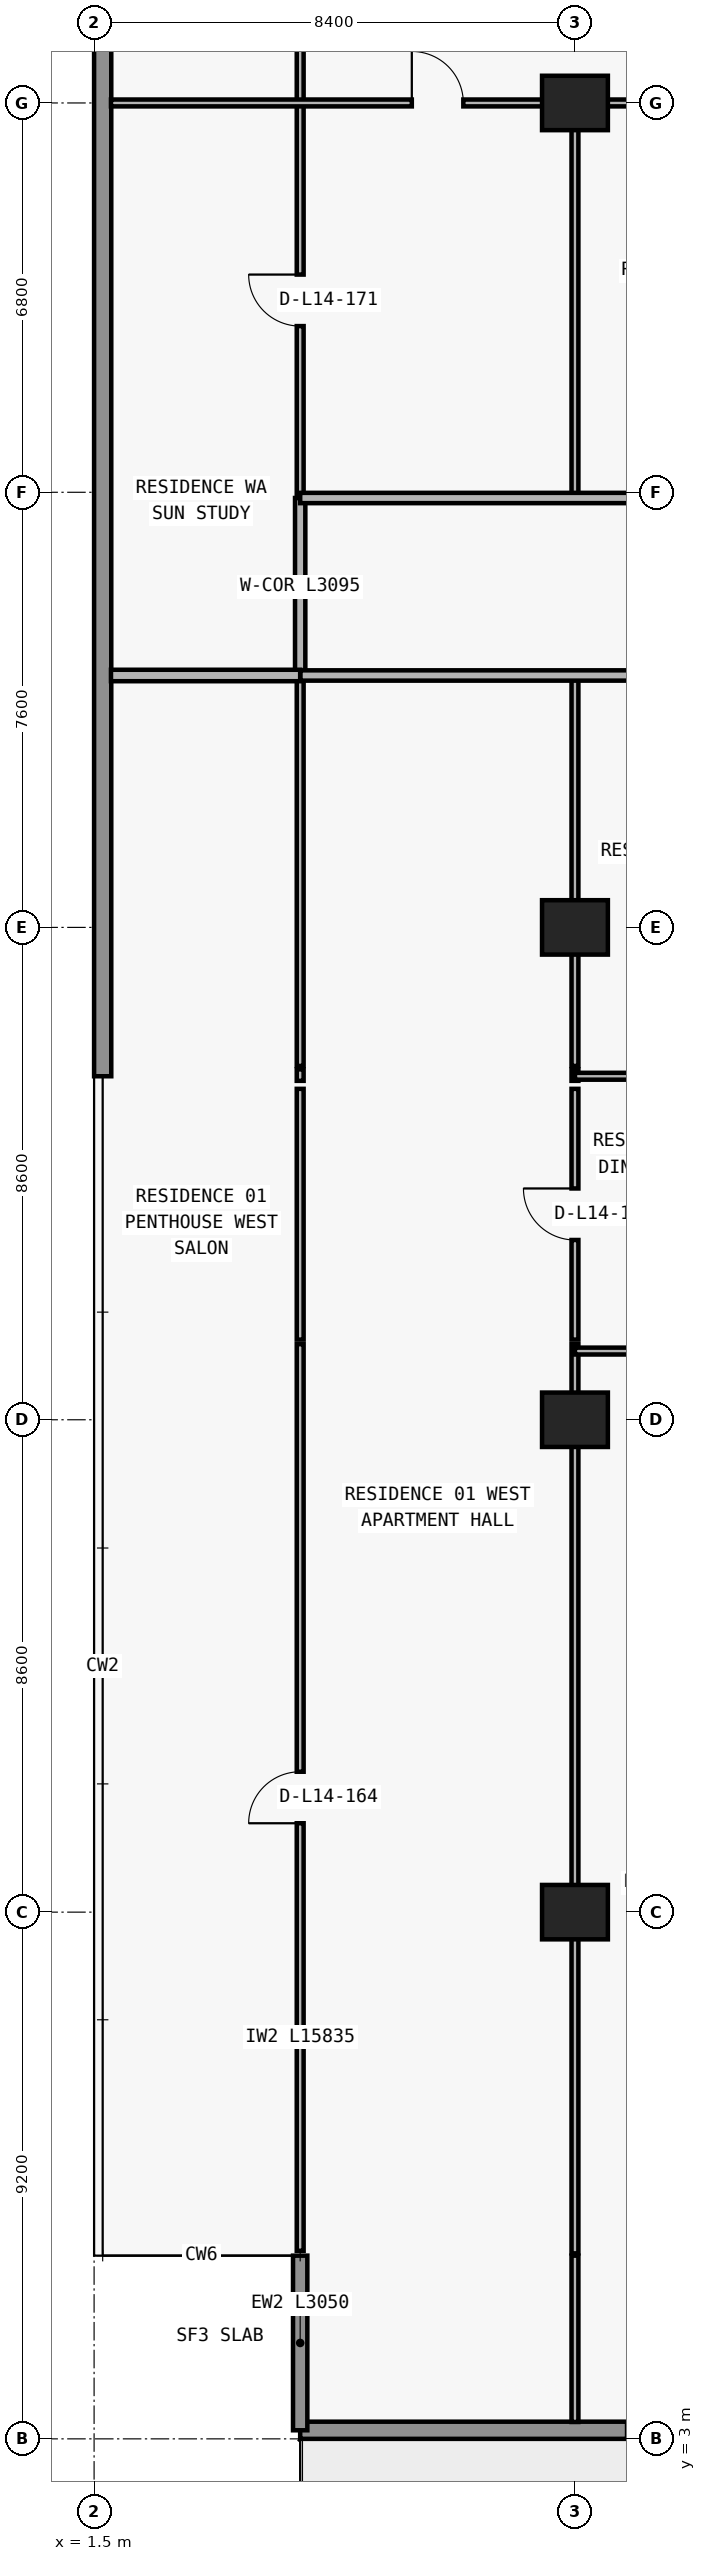
"""IFC4 building model, lengths in metres.
Left out: names, types, materials, properties, quantities, classifications, styles, units other than length and angle.
Written with IfcOpenShell. Run it as: python <this file> out.ifc"""

import sys

from ifc_helpers import new_model, si_unit, direction, frame, frame_2d, origin, origin_2d, place, context, subcontext, project, spatial, rectangle, extrude, element, fill, save


model = new_model("IFC4")
c1 = context("Model", 3, precision=1e-05, world=origin(), true_north=direction((0.0, 1.0)))
c2 = subcontext(c1, "Body", "Model", "MODEL_VIEW")
j1 = project(units=[si_unit("LENGTHUNIT", "METRE"), si_unit("PLANEANGLEUNIT", "RADIAN")], contexts=[c1])
p1 = place(None, origin())
s1 = spatial("IfcSite", under=j1, at=p1, CompositionType="ELEMENT")
p2 = place(p1, origin())
s2 = spatial("IfcBuilding", under=s1, at=p2, CompositionType="ELEMENT")
p3 = place(p2, frame((0.0, 0.0, 56.4)))
s3 = spatial("IfcBuildingStorey", under=s2, at=p3, CompositionType="ELEMENT", Elevation=56.4)
for number, where, z_axis, x_axis in (
    (1, (9.9, 12.2, 0.0), (0.0, 0.0, 1.0), (1.0, 0.0, 0.0)),
    (2, (9.9, 20.8, 0.0), (0.0, 0.0, 1.0), (1.0, 0.0, 0.0)),
    (3, (9.9, 29.4, 0.0), (0.0, 0.0, 1.0), (1.0, 0.0, 0.0)),
    (4, (9.9, 43.8, 0.0), (0.0, 0.0, 1.0), (1.0, 0.0, 0.0)),
):
    element("IfcColumn", number, at=place(p3, frame(where, z_axis=z_axis, x_axis=x_axis)), inside=s3, PredefinedType="COLUMN", context=c2, shape_type="SweptSolid", body=[
        extrude(rectangle(XDim=1.15, YDim=0.95, at=origin_2d()), origin(), (0.0, 0.0, 1.0), 3.05),
    ])
p4 = place(p3, frame((72.7, 3.15, 0.0), z_axis=(0.0, 0.0, 1.0), x_axis=(-1.0, 0.0, 0.0)))
e5 = element("IfcWall", 5, at=p4, inside=s3, PredefinedType="STANDARD", context=c2, shape_type="SweptSolid", body=[
    extrude(rectangle(XDim=67.6, YDim=0.3, at=frame_2d((33.8, 0.0))), origin(), (0.0, 0.0, 1.0), 3.05),
])
p5 = place(p4, frame((59.89, 0.0, 0.0)))
e6 = element("IfcOpeningElement", 6, at=p5, cuts=e5, PredefinedType="OPENING", context=c2, shape_type="SweptSolid", body=[
    extrude(rectangle(XDim=2.0, YDim=2.3, at=frame_2d((1.0, 1.15))), frame((0.0, 0.16, 0.0), z_axis=(0.0, -1.0, 0.0), x_axis=(1.0, 0.0, 0.0)), (0.0, 0.0, 1.0), 0.32),
])
p6 = place(p4, frame((55.21, 0.0, 0.65)))
e7 = element("IfcOpeningElement", 7, at=p6, cuts=e5, PredefinedType="OPENING", context=c2, shape_type="SweptSolid", body=[
    extrude(rectangle(XDim=2.6, YDim=1.85, at=frame_2d((1.3, 0.925))), frame((0.0, 0.16, 0.0), z_axis=(0.0, -1.0, 0.0), x_axis=(1.0, 0.0, 0.0)), (0.0, 0.0, 1.0), 0.32),
])
p7 = place(p4, frame((49.1, 0.0, 0.85)))
e8 = element("IfcOpeningElement", 8, at=p7, cuts=e5, PredefinedType="OPENING", context=c2, shape_type="SweptSolid", body=[
    extrude(rectangle(XDim=2.2, YDim=1.55, at=frame_2d((1.1, 0.775))), frame((0.0, 0.16, 0.0), z_axis=(0.0, -1.0, 0.0), x_axis=(1.0, 0.0, 0.0)), (0.0, 0.0, 1.0), 0.32),
])
p8 = place(p4, frame((43.09, 0.0, 0.0)))
e9 = element("IfcOpeningElement", 9, at=p8, cuts=e5, PredefinedType="OPENING", context=c2, shape_type="SweptSolid", body=[
    extrude(rectangle(XDim=2.0, YDim=2.3, at=frame_2d((1.0, 1.15))), frame((0.0, 0.16, 0.0), z_axis=(0.0, -1.0, 0.0), x_axis=(1.0, 0.0, 0.0)), (0.0, 0.0, 1.0), 0.32),
])
p9 = place(p4, frame((38.41, 0.0, 0.65)))
e10 = element("IfcOpeningElement", 10, at=p9, cuts=e5, PredefinedType="OPENING", context=c2, shape_type="SweptSolid", body=[
    extrude(rectangle(XDim=2.6, YDim=1.85, at=frame_2d((1.3, 0.925))), frame((0.0, 0.16, 0.0), z_axis=(0.0, -1.0, 0.0), x_axis=(1.0, 0.0, 0.0)), (0.0, 0.0, 1.0), 0.32),
])
p10 = place(p4, frame((32.7, 0.0, 0.85)))
e11 = element("IfcOpeningElement", 11, at=p10, cuts=e5, PredefinedType="OPENING", context=c2, shape_type="SweptSolid", body=[
    extrude(rectangle(XDim=2.2, YDim=1.55, at=frame_2d((1.1, 0.775))), frame((0.0, 0.16, 0.0), z_axis=(0.0, -1.0, 0.0), x_axis=(1.0, 0.0, 0.0)), (0.0, 0.0, 1.0), 0.32),
])
p11 = place(p4, frame((27.026, 0.0, 0.0)))
e12 = element("IfcOpeningElement", 12, at=p11, cuts=e5, PredefinedType="OPENING", context=c2, shape_type="SweptSolid", body=[
    extrude(rectangle(XDim=2.0, YDim=2.3, at=frame_2d((1.0, 1.15))), frame((0.0, 0.16, 0.0), z_axis=(0.0, -1.0, 0.0), x_axis=(1.0, 0.0, 0.0)), (0.0, 0.0, 1.0), 0.32),
])
p12 = place(p4, frame((22.726, 0.0, 0.85)))
e13 = element("IfcOpeningElement", 13, at=p12, cuts=e5, PredefinedType="OPENING", context=c2, shape_type="SweptSolid", body=[
    extrude(rectangle(XDim=2.2, YDim=1.55, at=frame_2d((1.1, 0.775))), frame((0.0, 0.16, 0.0), z_axis=(0.0, -1.0, 0.0), x_axis=(1.0, 0.0, 0.0)), (0.0, 0.0, 1.0), 0.32),
])
p13 = place(p4, frame((18.29, 0.0, 0.0)))
e14 = element("IfcOpeningElement", 14, at=p13, cuts=e5, PredefinedType="OPENING", context=c2, shape_type="SweptSolid", body=[
    extrude(rectangle(XDim=2.0, YDim=2.3, at=frame_2d((1.0, 1.15))), frame((0.0, 0.16, 0.0), z_axis=(0.0, -1.0, 0.0), x_axis=(1.0, 0.0, 0.0)), (0.0, 0.0, 1.0), 0.32),
])
p14 = place(p4, frame((14.19, 0.0, 0.85)))
e15 = element("IfcOpeningElement", 15, at=p14, cuts=e5, PredefinedType="OPENING", context=c2, shape_type="SweptSolid", body=[
    extrude(rectangle(XDim=1.8, YDim=1.55, at=frame_2d((0.9, 0.775))), frame((0.0, 0.16, 0.0), z_axis=(0.0, -1.0, 0.0), x_axis=(1.0, 0.0, 0.0)), (0.0, 0.0, 1.0), 0.32),
])
p15 = place(p4, frame((10.226, 0.0, 0.0)))
e16 = element("IfcOpeningElement", 16, at=p15, cuts=e5, PredefinedType="OPENING", context=c2, shape_type="SweptSolid", body=[
    extrude(rectangle(XDim=2.0, YDim=2.3, at=frame_2d((1.0, 1.15))), frame((0.0, 0.16, 0.0), z_axis=(0.0, -1.0, 0.0), x_axis=(1.0, 0.0, 0.0)), (0.0, 0.0, 1.0), 0.32),
])
p16 = place(p4, frame((5.926, 0.0, 0.85)))
e17 = element("IfcOpeningElement", 17, at=p16, cuts=e5, PredefinedType="OPENING", context=c2, shape_type="SweptSolid", body=[
    extrude(rectangle(XDim=2.2, YDim=1.55, at=frame_2d((1.1, 0.775))), frame((0.0, 0.16, 0.0), z_axis=(0.0, -1.0, 0.0), x_axis=(1.0, 0.0, 0.0)), (0.0, 0.0, 1.0), 0.32),
])
p17 = place(p3, frame((5.1, 6.2, 0.0), z_axis=(0.0, 0.0, 1.0), x_axis=(0.0, -1.0, 0.0)))
e18 = element("IfcWall", 18, at=p17, inside=s3, PredefinedType="ELEMENTEDWALL", context=c2, shape_type="SweptSolid", body=[
    extrude(rectangle(XDim=3.05, YDim=0.25, at=frame_2d((1.525, 0.0))), origin(), (0.0, 0.0, 1.0), 3.05),
])
p18 = place(p3, frame((1.65, 26.8, 0.0), z_axis=(0.0, 0.0, 1.0), x_axis=(0.0, 1.0, 0.0)))
e19 = element("IfcWall", 19, at=p18, inside=s3, PredefinedType="STANDARD", context=c2, shape_type="SweptSolid", body=[
    extrude(rectangle(XDim=20.6, YDim=0.3, at=frame_2d((10.3, 0.0))), origin(), (0.0, 0.0, 1.0), 3.05),
])
p19 = place(p3, frame((5.1, 6.285, 0.0), z_axis=(0.0, 0.0, 1.0), x_axis=(0.0, 1.0, 0.0)))
e20 = element("IfcWall", 20, at=p19, inside=s3, PredefinedType="PARTITIONING", context=c2, shape_type="SweptSolid", body=[
    extrude(rectangle(XDim=15.835, YDim=0.12, at=frame_2d((7.917, 0.0))), origin(), (0.0, 0.0, 1.0), 3.05),
])
p20 = place(p19, frame((7.468, 0.0, 0.0)))
e21 = element("IfcOpeningElement", 21, at=p20, cuts=e20, PredefinedType="OPENING", context=c2, shape_type="SweptSolid", body=[
    extrude(rectangle(XDim=0.9, YDim=2.15, at=frame_2d((0.45, 1.075))), frame((0.0, 0.07, 0.0), z_axis=(0.0, -1.0, 0.0), x_axis=(1.0, 0.0, 0.0)), (0.0, 0.0, 1.0), 0.14),
])
p21 = place(p3, frame((5.1, 22.2, 0.0), z_axis=(0.0, 0.0, 1.0), x_axis=(0.0, 1.0, 0.0)))
e22 = element("IfcWall", 22, at=p21, inside=s3, PredefinedType="PARTITIONING", context=c2, shape_type="SweptSolid", body=[
    extrude(rectangle(XDim=4.38, YDim=0.12, at=frame_2d((2.19, 0.0))), origin(), (0.0, 0.0, 1.0), 3.05),
])
p22 = place(p3, frame((5.1, 26.72, 0.0), z_axis=(0.0, 0.0, 1.0), x_axis=(0.0, 1.0, 0.0)))
e23 = element("IfcWall", 23, at=p22, inside=s3, PredefinedType="PARTITIONING", context=c2, shape_type="SweptSolid", body=[
    extrude(rectangle(XDim=0.2, YDim=0.12, at=frame_2d((0.1, 0.0))), origin(), (0.0, 0.0, 1.0), 3.05),
])
p23 = place(p3, frame((5.1, 26.98, 0.0), z_axis=(0.0, 0.0, 1.0), x_axis=(0.0, 1.0, 0.0)))
e24 = element("IfcWall", 24, at=p23, inside=s3, PredefinedType="PARTITIONING", context=c2, shape_type="SweptSolid", body=[
    extrude(rectangle(XDim=6.82, YDim=0.12, at=frame_2d((3.41, 0.0))), origin(), (0.0, 0.0, 1.0), 3.05),
])
p24 = place(p3, frame((5.1, 33.805, 0.0), z_axis=(0.0, 0.0, 1.0), x_axis=(0.0, 1.0, 0.0)))
e25 = element("IfcWall", 25, at=p24, inside=s3, PredefinedType="PARTITIONING", context=c2, shape_type="SweptSolid", body=[
    extrude(rectangle(XDim=3.095, YDim=0.18, at=frame_2d((1.547, 0.0))), origin(), (0.0, 0.0, 1.0), 3.05),
])
p25 = place(p3, frame((5.1, 36.905, 0.0), z_axis=(0.0, 0.0, 1.0), x_axis=(0.0, 1.0, 0.0)))
e26 = element("IfcWall", 26, at=p25, inside=s3, PredefinedType="PARTITIONING", context=c2, shape_type="SweptSolid", body=[
    extrude(rectangle(XDim=10.375, YDim=0.12, at=frame_2d((5.188, 0.0))), origin(), (0.0, 0.0, 1.0), 3.05),
])
p26 = place(p25, frame((2.998, 0.0, 0.0)))
e27 = element("IfcOpeningElement", 27, at=p26, cuts=e26, PredefinedType="OPENING", context=c2, shape_type="SweptSolid", body=[
    extrude(rectangle(XDim=0.9, YDim=2.15, at=frame_2d((0.45, 1.075))), frame((0.0, 0.07, 0.0), z_axis=(0.0, -1.0, 0.0), x_axis=(1.0, 0.0, 0.0)), (0.0, 0.0, 1.0), 0.14),
])
p27 = place(p25, frame((8.185, 0.0, 0.0)))
e28 = element("IfcOpeningElement", 28, at=p27, cuts=e26, PredefinedType="OPENING", context=c2, shape_type="SweptSolid", body=[
    extrude(rectangle(XDim=0.9, YDim=2.15, at=frame_2d((0.45, 1.075))), frame((0.0, 0.07, 0.0), z_axis=(0.0, -1.0, 0.0), x_axis=(1.0, 0.0, 0.0)), (0.0, 0.0, 1.0), 0.14),
])
p28 = place(p3, frame((9.9, 3.295, 0.0), z_axis=(0.0, 0.0, 1.0), x_axis=(0.0, 1.0, 0.0)))
e29 = element("IfcWall", 29, at=p28, inside=s3, PredefinedType="PARTITIONING", context=c2, shape_type="SweptSolid", body=[
    extrude(rectangle(XDim=2.905, YDim=0.12, at=frame_2d((1.453, 0.0))), origin(), (0.0, 0.0, 1.0), 3.05),
])
p29 = place(p3, frame((9.9, 6.24, 0.0), z_axis=(0.0, 0.0, 1.0), x_axis=(0.0, 1.0, 0.0)))
e30 = element("IfcWall", 30, at=p29, inside=s3, PredefinedType="PARTITIONING", context=c2, shape_type="SweptSolid", body=[
    extrude(rectangle(XDim=15.88, YDim=0.12, at=frame_2d((7.94, 0.0))), origin(), (0.0, 0.0, 1.0), 2.11),
])
p30 = place(p3, frame((9.9, 22.2, 0.0), z_axis=(0.0, 0.0, 1.0), x_axis=(0.0, 1.0, 0.0)))
e31 = element("IfcWall", 31, at=p30, inside=s3, PredefinedType="PARTITIONING", context=c2, shape_type="SweptSolid", body=[
    extrude(rectangle(XDim=4.38, YDim=0.12, at=frame_2d((2.19, 0.0))), origin(), (0.0, 0.0, 1.0), 2.11),
])
p31 = place(p30, frame((1.74, 0.0, 0.0)))
e32 = element("IfcOpeningElement", 32, at=p31, cuts=e31, PredefinedType="OPENING", context=c2, shape_type="SweptSolid", body=[
    extrude(rectangle(XDim=0.9, YDim=2.06, at=frame_2d((0.45, 1.03))), frame((0.0, 0.07, 0.0), z_axis=(0.0, -1.0, 0.0), x_axis=(1.0, 0.0, 0.0)), (0.0, 0.0, 1.0), 0.14),
])
p32 = place(p3, frame((9.9, 26.72, 0.0), z_axis=(0.0, 0.0, 1.0), x_axis=(0.0, 1.0, 0.0)))
e33 = element("IfcWall", 33, at=p32, inside=s3, PredefinedType="PARTITIONING", context=c2, shape_type="SweptSolid", body=[
    extrude(rectangle(XDim=0.2, YDim=0.12, at=frame_2d((0.1, 0.0))), origin(), (0.0, 0.0, 1.0), 2.11),
])
p33 = place(p3, frame((9.9, 26.98, 0.0), z_axis=(0.0, 0.0, 1.0), x_axis=(0.0, 1.0, 0.0)))
e34 = element("IfcWall", 34, at=p33, inside=s3, PredefinedType="PARTITIONING", context=c2, shape_type="SweptSolid", body=[
    extrude(rectangle(XDim=6.82, YDim=0.12, at=frame_2d((3.41, 0.0))), origin(), (0.0, 0.0, 1.0), 2.11),
])
p34 = place(p3, frame((9.9, 36.9, 0.0), z_axis=(0.0, 0.0, 1.0), x_axis=(0.0, 1.0, 0.0)))
e35 = element("IfcWall", 35, at=p34, inside=s3, PredefinedType="PARTITIONING", context=c2, shape_type="SweptSolid", body=[
    extrude(rectangle(XDim=6.9, YDim=0.12, at=frame_2d((3.45, 0.0))), origin(), (0.0, 0.0, 1.0), 2.11),
])
p35 = place(p3, frame((9.9, 22.0, 0.0), z_axis=(0.0, 0.0, 1.0), x_axis=(1.0, 0.0, 0.0)))
e36 = element("IfcWall", 36, at=p35, inside=s3, PredefinedType="PARTITIONING", context=c2, shape_type="SweptSolid", body=[
    extrude(rectangle(XDim=8.4, YDim=0.12, at=frame_2d((4.2, 0.0))), origin(), (0.0, 0.0, 1.0), 3.05),
])
p36 = place(p35, frame((1.44, 0.0, 0.0)))
e37 = element("IfcOpeningElement", 37, at=p36, cuts=e36, PredefinedType="OPENING", context=c2, shape_type="SweptSolid", body=[
    extrude(rectangle(XDim=0.9, YDim=2.15, at=frame_2d((0.45, 1.075))), frame((0.0, 0.07, 0.0), z_axis=(0.0, -1.0, 0.0), x_axis=(1.0, 0.0, 0.0)), (0.0, 0.0, 1.0), 0.14),
])
p37 = place(p3, frame((9.9, 26.8, 0.0), z_axis=(0.0, 0.0, 1.0), x_axis=(1.0, 0.0, 0.0)))
e38 = element("IfcWall", 38, at=p37, inside=s3, PredefinedType="PARTITIONING", context=c2, shape_type="SweptSolid", body=[
    extrude(rectangle(XDim=8.395, YDim=0.12, at=frame_2d((4.198, 0.0))), origin(), (0.0, 0.0, 1.0), 3.05),
])
p38 = place(p37, frame((1.44, 0.0, 0.0)))
e39 = element("IfcOpeningElement", 39, at=p38, cuts=e38, PredefinedType="OPENING", context=c2, shape_type="SweptSolid", body=[
    extrude(rectangle(XDim=0.9, YDim=2.15, at=frame_2d((0.45, 1.075))), frame((0.0, 0.07, 0.0), z_axis=(0.0, -1.0, 0.0), x_axis=(1.0, 0.0, 0.0)), (0.0, 0.0, 1.0), 0.14),
])
p39 = place(p3, frame((1.795, 33.8, 0.0), z_axis=(0.0, 0.0, 1.0), x_axis=(1.0, 0.0, 0.0)))
e40 = element("IfcWall", 40, at=p39, inside=s3, PredefinedType="PARTITIONING", context=c2, shape_type="SweptSolid", body=[
    extrude(rectangle(XDim=3.305, YDim=0.2, at=frame_2d((1.653, 0.0))), origin(), (0.0, 0.0, 1.0), 3.05),
])
p40 = place(p3, frame((5.105, 33.8, 0.0), z_axis=(0.0, 0.0, 1.0), x_axis=(1.0, 0.0, 0.0)))
e41 = element("IfcWall", 41, at=p40, inside=s3, PredefinedType="PARTITIONING", context=c2, shape_type="SweptSolid", body=[
    extrude(rectangle(XDim=67.595, YDim=0.18, at=frame_2d((33.797, 0.0))), origin(), (0.0, 0.0, 1.0), 3.05),
])
p41 = place(p40, frame((7.745, 0.0, 0.0)))
e42 = element("IfcOpeningElement", 42, at=p41, cuts=e41, PredefinedType="OPENING", context=c2, shape_type="SweptSolid", body=[
    extrude(rectangle(XDim=1.0, YDim=2.2, at=frame_2d((0.5, 1.1))), frame((0.0, 0.1, 0.0), z_axis=(0.0, -1.0, 0.0), x_axis=(1.0, 0.0, 0.0)), (0.0, 0.0, 1.0), 0.2),
])
p42 = place(p40, frame((24.545, 0.0, 0.0)))
e43 = element("IfcOpeningElement", 43, at=p42, cuts=e41, PredefinedType="OPENING", context=c2, shape_type="SweptSolid", body=[
    extrude(rectangle(XDim=1.0, YDim=2.2, at=frame_2d((0.5, 1.1))), frame((0.0, 0.1, 0.0), z_axis=(0.0, -1.0, 0.0), x_axis=(1.0, 0.0, 0.0)), (0.0, 0.0, 1.0), 0.2),
])
p43 = place(p40, frame((40.47, 0.0, 0.0)))
e44 = element("IfcOpeningElement", 44, at=p43, cuts=e41, PredefinedType="OPENING", context=c2, shape_type="SweptSolid", body=[
    extrude(rectangle(XDim=1.0, YDim=2.2, at=frame_2d((0.5, 1.1))), frame((0.0, 0.1, 0.0), z_axis=(0.0, -1.0, 0.0), x_axis=(1.0, 0.0, 0.0)), (0.0, 0.0, 1.0), 0.2),
])
p44 = place(p40, frame((48.87, 0.0, 0.0)))
e45 = element("IfcOpeningElement", 45, at=p44, cuts=e41, PredefinedType="OPENING", context=c2, shape_type="SweptSolid", body=[
    extrude(rectangle(XDim=1.0, YDim=2.2, at=frame_2d((0.5, 1.1))), frame((0.0, 0.1, 0.0), z_axis=(0.0, -1.0, 0.0), x_axis=(1.0, 0.0, 0.0)), (0.0, 0.0, 1.0), 0.2),
])
p45 = place(p40, frame((57.27, 0.0, 0.0)))
e46 = element("IfcOpeningElement", 46, at=p45, cuts=e41, PredefinedType="OPENING", context=c2, shape_type="SweptSolid", body=[
    extrude(rectangle(XDim=1.0, YDim=2.2, at=frame_2d((0.5, 1.1))), frame((0.0, 0.1, 0.0), z_axis=(0.0, -1.0, 0.0), x_axis=(1.0, 0.0, 0.0)), (0.0, 0.0, 1.0), 0.2),
])
p46 = place(p3, frame((5.1, 36.9, 0.0), z_axis=(0.0, 0.0, 1.0), x_axis=(1.0, 0.0, 0.0)))
e47 = element("IfcWall", 47, at=p46, inside=s3, PredefinedType="PARTITIONING", context=c2, shape_type="SweptSolid", body=[
    extrude(rectangle(XDim=12.645, YDim=0.18, at=frame_2d((6.323, 0.0))), origin(), (0.0, 0.0, 1.0), 3.05),
])
p47 = place(p46, frame((7.125, 0.0, 0.0)))
e48 = element("IfcOpeningElement", 48, at=p47, cuts=e47, PredefinedType="OPENING", context=c2, shape_type="SweptSolid", body=[
    extrude(rectangle(XDim=1.0, YDim=2.2, at=frame_2d((0.5, 1.1))), frame((0.0, 0.1, 0.0), z_axis=(0.0, -1.0, 0.0), x_axis=(1.0, 0.0, 0.0)), (0.0, 0.0, 1.0), 0.2),
])
p48 = place(p3, frame((1.795, 43.8, 0.0), z_axis=(0.0, 0.0, 1.0), x_axis=(1.0, 0.0, 0.0)))
e49 = element("IfcWall", 49, at=p48, inside=s3, PredefinedType="PARTITIONING", context=c2, shape_type="SweptSolid", body=[
    extrude(rectangle(XDim=15.96, YDim=0.12, at=frame_2d((7.98, 0.0))), origin(), (0.0, 0.0, 1.0), 2.339),
])
p49 = place(p48, frame((5.255, 0.0, 0.0)))
e50 = element("IfcOpeningElement", 50, at=p49, cuts=e49, PredefinedType="OPENING", context=c2, shape_type="SweptSolid", body=[
    extrude(rectangle(XDim=0.9, YDim=2.15, at=frame_2d((0.45, 1.075))), frame((0.0, 0.07, 0.0), z_axis=(0.0, -1.0, 0.0), x_axis=(1.0, 0.0, 0.0)), (0.0, 0.0, 1.0), 0.14),
])
p50 = place(p48, frame((10.48, 0.0, 0.0)))
e51 = element("IfcOpeningElement", 51, at=p50, cuts=e49, PredefinedType="OPENING", context=c2, shape_type="SweptSolid", body=[
    extrude(rectangle(XDim=0.9, YDim=2.15, at=frame_2d((0.45, 1.075))), frame((0.0, 0.07, 0.0), z_axis=(0.0, -1.0, 0.0), x_axis=(1.0, 0.0, 0.0)), (0.0, 0.0, 1.0), 0.14),
])
p51 = place(p48, frame((14.433, 0.0, 0.0)))
e52 = element("IfcOpeningElement", 52, at=p51, cuts=e49, PredefinedType="OPENING", context=c2, shape_type="SweptSolid", body=[
    extrude(rectangle(XDim=0.85, YDim=2.1, at=frame_2d((0.425, 1.05))), frame((0.0, 0.07, 0.0), z_axis=(0.0, -1.0, 0.0), x_axis=(1.0, 0.0, 0.0)), (0.0, 0.0, 1.0), 0.14),
])
p52 = place(p31, origin())
e53 = element("IfcDoor", 53, at=p52, inside=s3, OperationType="SINGLE_SWING_RIGHT", PredefinedType="DOOR", context=c2, shape_type="SweptSolid", body=[
    extrude(rectangle(XDim=0.9, YDim=2.06, at=frame_2d((0.45, 1.03))), frame((0.0, 0.025, 0.0), z_axis=(0.0, -1.0, 0.0), x_axis=(1.0, 0.0, 0.0)), (0.0, 0.0, 1.0), 0.05),
])
fill(e32, e53)
p53 = place(p20, origin())
e54 = element("IfcDoor", 54, at=p53, inside=s3, OperationType="SINGLE_SWING_LEFT", PredefinedType="DOOR", context=c2, shape_type="SweptSolid", body=[
    extrude(rectangle(XDim=0.9, YDim=2.15, at=frame_2d((0.45, 1.075))), frame((0.0, 0.025, 0.0), z_axis=(0.0, -1.0, 0.0), x_axis=(1.0, 0.0, 0.0)), (0.0, 0.0, 1.0), 0.05),
])
fill(e21, e54)
p54 = place(p49, origin())
e55 = element("IfcDoor", 55, at=p54, inside=s3, OperationType="SINGLE_SWING_LEFT", PredefinedType="DOOR", context=c2, shape_type="SweptSolid", body=[
    extrude(rectangle(XDim=0.9, YDim=2.15, at=frame_2d((0.45, 1.075))), frame((0.0, 0.025, 0.0), z_axis=(0.0, -1.0, 0.0), x_axis=(1.0, 0.0, 0.0)), (0.0, 0.0, 1.0), 0.05),
])
fill(e50, e55)
p55 = place(p26, origin())
e56 = element("IfcDoor", 56, at=p55, inside=s3, OperationType="SINGLE_SWING_RIGHT", PredefinedType="DOOR", context=c2, shape_type="SweptSolid", body=[
    extrude(rectangle(XDim=0.9, YDim=2.15, at=frame_2d((0.45, 1.075))), frame((0.0, 0.025, 0.0), z_axis=(0.0, -1.0, 0.0), x_axis=(1.0, 0.0, 0.0)), (0.0, 0.0, 1.0), 0.05),
])
fill(e27, e56)
save(model, sys.argv[1])
